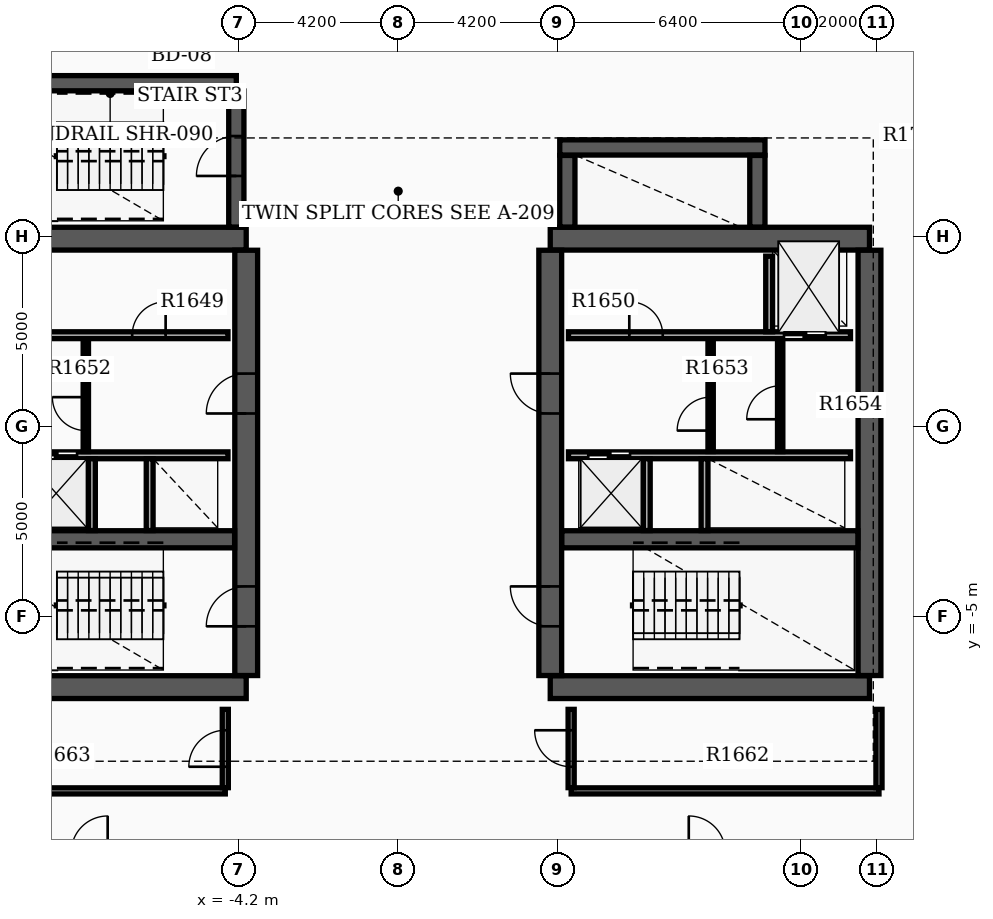
"""IFC4 building model, lengths in metres.
Left out: names, types, materials, properties, quantities, classifications, styles, units other than length and angle.
Written with IfcOpenShell. Run it as: python <this file> out.ifc"""

import sys

from ifc_helpers import new_model, si_unit, direction, frame, frame_2d, origin, place, context, subcontext, project, spatial, rectangle, extrude, element, fill, save


model = new_model("IFC4")
c1 = context("Model", 3, precision=1e-05, world=origin(), true_north=direction((0.0, 1.0)))
c2 = subcontext(c1, "Body", "Model", "MODEL_VIEW")
j1 = project(units=[si_unit("LENGTHUNIT", "METRE"), si_unit("PLANEANGLEUNIT", "RADIAN")], contexts=[c1])
p1 = place(None, origin())
s1 = spatial("IfcSite", under=j1, at=p1, CompositionType="ELEMENT")
p2 = place(p1, origin())
s2 = spatial("IfcBuilding", under=s1, at=p2, CompositionType="ELEMENT")
p3 = place(p2, frame((0.0, 0.0, 108.6)))
s3 = spatial("IfcBuildingStorey", under=s2, at=p3, CompositionType="ELEMENT", Elevation=108.6)
for number, where, z_axis, x_axis in (
    (1, (-12.4, -6.85, 0.0), (0.0, 0.0, 1.0), (1.0, 0.0, 0.0)),
    (2, (-12.4, 4.95, 0.0), (0.0, 0.0, 1.0), (1.0, 0.0, 0.0)),
):
    element("IfcWall", number, at=place(p3, frame(where, z_axis=z_axis, x_axis=x_axis)), inside=s3, PredefinedType="SHEAR", context=c2, shape_type="SweptSolid", body=[
        extrude(rectangle(XDim=8.4, YDim=0.6, at=frame_2d((4.2, 0.0))), origin(), (0.0, 0.0, 1.0), 3.7),
    ])
p4 = place(p3, frame((-4.0, -6.545, 0.0), z_axis=(0.0, 0.0, 1.0), x_axis=(0.0, 1.0, 0.0)))
e3 = element("IfcWall", 3, at=p4, inside=s3, PredefinedType="SHEAR", context=c2, shape_type="SweptSolid", body=[
    extrude(rectangle(XDim=11.19, YDim=0.6, at=frame_2d((5.595, 0.0))), origin(), (0.0, 0.0, 1.0), 3.7),
])
p5 = place(p4, frame((1.295, 0.0, 0.0)))
e4 = element("IfcOpeningElement", 4, at=p5, cuts=e3, PredefinedType="OPENING", context=c2, shape_type="SweptSolid", body=[
    extrude(rectangle(XDim=1.05, YDim=2.15, at=frame_2d((0.525, 1.075))), frame((0.0, 0.31, 0.0), z_axis=(0.0, -1.0, 0.0), x_axis=(1.0, 0.0, 0.0)), (0.0, 0.0, 1.0), 0.62),
])
p6 = place(p4, frame((6.895, 0.0, 0.0)))
e5 = element("IfcOpeningElement", 5, at=p6, cuts=e3, PredefinedType="OPENING", context=c2, shape_type="SweptSolid", body=[
    extrude(rectangle(XDim=1.05, YDim=2.15, at=frame_2d((0.525, 1.075))), frame((0.0, 0.31, 0.0), z_axis=(0.0, -1.0, 0.0), x_axis=(1.0, 0.0, 0.0)), (0.0, 0.0, 1.0), 0.62),
])
p7 = place(p3, frame((-12.095, -2.96, 0.0), z_axis=(0.0, 0.0, 1.0), x_axis=(1.0, 0.0, 0.0)))
e6 = element("IfcWall", 6, at=p7, inside=s3, PredefinedType="SHEAR", context=c2, shape_type="SweptSolid", body=[
    extrude(rectangle(XDim=7.79, YDim=0.45, at=frame_2d((3.895, 0.0))), origin(), (0.0, 0.0, 1.0), 3.7),
])
for number, where, z_axis, x_axis in (
    (7, (4.0, -6.85, 0.0), (0.0, 0.0, 1.0), (1.0, 0.0, 0.0)),
    (8, (4.0, 4.95, 0.0), (0.0, 0.0, 1.0), (1.0, 0.0, 0.0)),
):
    element("IfcWall", number, at=place(p3, frame(where, z_axis=z_axis, x_axis=x_axis)), inside=s3, PredefinedType="SHEAR", context=c2, shape_type="SweptSolid", body=[
        extrude(rectangle(XDim=8.4, YDim=0.6, at=frame_2d((4.2, 0.0))), origin(), (0.0, 0.0, 1.0), 3.7),
    ])
p8 = place(p3, frame((4.0, -6.545, 0.0), z_axis=(0.0, 0.0, 1.0), x_axis=(0.0, 1.0, 0.0)))
e9 = element("IfcWall", 9, at=p8, inside=s3, PredefinedType="SHEAR", context=c2, shape_type="SweptSolid", body=[
    extrude(rectangle(XDim=11.19, YDim=0.6, at=frame_2d((5.595, 0.0))), origin(), (0.0, 0.0, 1.0), 3.7),
])
p9 = place(p8, frame((1.295, 0.0, 0.0)))
e10 = element("IfcOpeningElement", 10, at=p9, cuts=e9, PredefinedType="OPENING", context=c2, shape_type="SweptSolid", body=[
    extrude(rectangle(XDim=1.05, YDim=2.15, at=frame_2d((0.525, 1.075))), frame((0.0, 0.31, 0.0), z_axis=(0.0, -1.0, 0.0), x_axis=(1.0, 0.0, 0.0)), (0.0, 0.0, 1.0), 0.62),
])
p10 = place(p8, frame((6.895, 0.0, 0.0)))
e11 = element("IfcOpeningElement", 11, at=p10, cuts=e9, PredefinedType="OPENING", context=c2, shape_type="SweptSolid", body=[
    extrude(rectangle(XDim=1.05, YDim=2.15, at=frame_2d((0.525, 1.075))), frame((0.0, 0.31, 0.0), z_axis=(0.0, -1.0, 0.0), x_axis=(1.0, 0.0, 0.0)), (0.0, 0.0, 1.0), 0.62),
])
p11 = place(p3, frame((12.4, -6.545, 0.0), z_axis=(0.0, 0.0, 1.0), x_axis=(0.0, 1.0, 0.0)))
e12 = element("IfcWall", 12, at=p11, inside=s3, PredefinedType="SHEAR", context=c2, shape_type="SweptSolid", body=[
    extrude(rectangle(XDim=11.19, YDim=0.6, at=frame_2d((5.595, 0.0))), origin(), (0.0, 0.0, 1.0), 3.7),
])
p12 = place(p3, frame((4.305, -2.96, 0.0), z_axis=(0.0, 0.0, 1.0), x_axis=(1.0, 0.0, 0.0)))
e13 = element("IfcWall", 13, at=p12, inside=s3, PredefinedType="SHEAR", context=c2, shape_type="SweptSolid", body=[
    extrude(rectangle(XDim=7.79, YDim=0.45, at=frame_2d((3.895, 0.0))), origin(), (0.0, 0.0, 1.0), 3.7),
])
p13 = place(p3, frame((-12.22, 9.04, 0.0), z_axis=(0.0, 0.0, 1.0), x_axis=(1.0, 0.0, 0.0)))
e14 = element("IfcWall", 14, at=p13, inside=s3, PredefinedType="SHEAR", context=c2, shape_type="SweptSolid", body=[
    extrude(rectangle(XDim=7.96, YDim=0.4, at=frame_2d((3.98, 0.0))), origin(), (0.0, 0.0, 1.0), 3.7),
])
p14 = place(p3, frame((-4.26, 5.255, 0.0), z_axis=(0.0, 0.0, 1.0), x_axis=(0.0, 1.0, 0.0)))
e15 = element("IfcWall", 15, at=p14, inside=s3, PredefinedType="SHEAR", context=c2, shape_type="SweptSolid", body=[
    extrude(rectangle(XDim=3.58, YDim=0.4, at=frame_2d((1.79, 0.0))), origin(), (0.0, 0.0, 1.0), 3.7),
])
p15 = place(p14, frame((1.345, 0.0, 0.0)))
e16 = element("IfcOpeningElement", 16, at=p15, cuts=e15, PredefinedType="OPENING", context=c2, shape_type="SweptSolid", body=[
    extrude(rectangle(XDim=1.05, YDim=2.15, at=frame_2d((0.525, 1.075))), frame((0.0, 0.21, 0.0), z_axis=(0.0, -1.0, 0.0), x_axis=(1.0, 0.0, 0.0)), (0.0, 0.0, 1.0), 0.42),
])
p16 = place(p3, frame((4.45, 5.255, 0.0), z_axis=(0.0, 0.0, 1.0), x_axis=(0.0, 1.0, 0.0)))
e17 = element("IfcWall", 17, at=p16, inside=s3, PredefinedType="SHEAR", context=c2, shape_type="SweptSolid", body=[
    extrude(rectangle(XDim=1.885, YDim=0.4, at=frame_2d((0.942, 0.0))), origin(), (0.0, 0.0, 1.0), 3.7),
])
p17 = place(p3, frame((4.25, 7.35, 0.0), z_axis=(0.0, 0.0, 1.0), x_axis=(1.0, 0.0, 0.0)))
e18 = element("IfcWall", 18, at=p17, inside=s3, PredefinedType="SHEAR", context=c2, shape_type="SweptSolid", body=[
    extrude(rectangle(XDim=5.4, YDim=0.4, at=frame_2d((2.7, 0.0))), origin(), (0.0, 0.0, 1.0), 3.7),
])
p18 = place(p3, frame((9.45, 5.255, 0.0), z_axis=(0.0, 0.0, 1.0), x_axis=(0.0, 1.0, 0.0)))
e19 = element("IfcWall", 19, at=p18, inside=s3, PredefinedType="SHEAR", context=c2, shape_type="SweptSolid", body=[
    extrude(rectangle(XDim=1.885, YDim=0.4, at=frame_2d((0.942, 0.0))), origin(), (0.0, 0.0, 1.0), 3.7),
])
p19 = place(p3, frame((-11.9, 2.41, 0.0), z_axis=(0.0, 0.0, 1.0), x_axis=(1.0, 0.0, 0.0)))
e20 = element("IfcWall", 20, at=p19, inside=s3, PredefinedType="SOLIDWALL", context=c2, shape_type="SweptSolid", body=[
    extrude(rectangle(XDim=7.42, YDim=0.18, at=frame_2d((3.71, 0.0))), origin(), (0.0, 0.0, 1.0), 2.96),
])
p20 = place(p19, frame((0.55, 0.0, 0.0)))
e21 = element("IfcOpeningElement", 21, at=p20, cuts=e20, PredefinedType="OPENING", context=c2, shape_type="SweptSolid", body=[
    extrude(rectangle(XDim=1.1, YDim=2.15, at=frame_2d((0.55, 1.075))), frame((0.0, 0.1, 0.0), z_axis=(0.0, -1.0, 0.0), x_axis=(1.0, 0.0, 0.0)), (0.0, 0.0, 1.0), 0.2),
])
p21 = place(p19, frame((4.9, 0.0, 0.0)))
e22 = element("IfcOpeningElement", 22, at=p21, cuts=e20, PredefinedType="OPENING", context=c2, shape_type="SweptSolid", body=[
    extrude(rectangle(XDim=0.88, YDim=2.1, at=frame_2d((0.44, 1.05))), frame((0.0, 0.1, 0.0), z_axis=(0.0, -1.0, 0.0), x_axis=(1.0, 0.0, 0.0)), (0.0, 0.0, 1.0), 0.2),
])
p22 = place(p3, frame((4.48, 2.41, 0.0), z_axis=(0.0, 0.0, 1.0), x_axis=(1.0, 0.0, 0.0)))
e23 = element("IfcWall", 23, at=p22, inside=s3, PredefinedType="SOLIDWALL", context=c2, shape_type="SweptSolid", body=[
    extrude(rectangle(XDim=7.42, YDim=0.18, at=frame_2d((3.71, 0.0))), origin(), (0.0, 0.0, 1.0), 2.96),
])
p23 = place(p22, frame((5.67, 0.0, 0.0)))
e24 = element("IfcOpeningElement", 24, at=p23, cuts=e23, PredefinedType="OPENING", context=c2, shape_type="SweptSolid", body=[
    extrude(rectangle(XDim=1.1, YDim=2.15, at=frame_2d((0.55, 1.075))), frame((0.0, 0.1, 0.0), z_axis=(0.0, -1.0, 0.0), x_axis=(1.0, 0.0, 0.0)), (0.0, 0.0, 1.0), 0.2),
])
p24 = place(p22, frame((1.6, 0.0, 0.0)))
e25 = element("IfcOpeningElement", 25, at=p24, cuts=e23, PredefinedType="OPENING", context=c2, shape_type="SweptSolid", body=[
    extrude(rectangle(XDim=0.88, YDim=2.1, at=frame_2d((0.44, 1.05))), frame((0.0, 0.1, 0.0), z_axis=(0.0, -1.0, 0.0), x_axis=(1.0, 0.0, 0.0)), (0.0, 0.0, 1.0), 0.2),
])
p25 = place(p3, frame((-11.9, -0.75, 0.0), z_axis=(0.0, 0.0, 1.0), x_axis=(1.0, 0.0, 0.0)))
e26 = element("IfcWall", 26, at=p25, inside=s3, PredefinedType="SOLIDWALL", context=c2, shape_type="SweptSolid", body=[
    extrude(rectangle(XDim=7.42, YDim=0.18, at=frame_2d((3.71, 0.0))), origin(), (0.0, 0.0, 1.0), 2.96),
])
p26 = place(p25, frame((0.45, 0.0, 0.0)))
e27 = element("IfcOpeningElement", 27, at=p26, cuts=e26, PredefinedType="OPENING", context=c2, shape_type="SweptSolid", body=[
    extrude(rectangle(XDim=1.1, YDim=2.15, at=frame_2d((0.55, 1.075))), frame((0.0, 0.1, 0.0), z_axis=(0.0, -1.0, 0.0), x_axis=(1.0, 0.0, 0.0)), (0.0, 0.0, 1.0), 0.2),
])
p27 = place(p25, frame((2.35, 0.0, 0.0)))
e28 = element("IfcOpeningElement", 28, at=p27, cuts=e26, PredefinedType="OPENING", context=c2, shape_type="SweptSolid", body=[
    extrude(rectangle(XDim=1.1, YDim=2.15, at=frame_2d((0.55, 1.075))), frame((0.0, 0.1, 0.0), z_axis=(0.0, -1.0, 0.0), x_axis=(1.0, 0.0, 0.0)), (0.0, 0.0, 1.0), 0.2),
])
p28 = place(p3, frame((4.48, -0.75, 0.0), z_axis=(0.0, 0.0, 1.0), x_axis=(1.0, 0.0, 0.0)))
e29 = element("IfcWall", 29, at=p28, inside=s3, PredefinedType="SOLIDWALL", context=c2, shape_type="SweptSolid", body=[
    extrude(rectangle(XDim=7.42, YDim=0.18, at=frame_2d((3.71, 0.0))), origin(), (0.0, 0.0, 1.0), 2.96),
])
p29 = place(p28, frame((0.52, 0.0, 0.0)))
e30 = element("IfcOpeningElement", 30, at=p29, cuts=e29, PredefinedType="OPENING", context=c2, shape_type="SweptSolid", body=[
    extrude(rectangle(XDim=1.1, YDim=2.15, at=frame_2d((0.55, 1.075))), frame((0.0, 0.1, 0.0), z_axis=(0.0, -1.0, 0.0), x_axis=(1.0, 0.0, 0.0)), (0.0, 0.0, 1.0), 0.2),
])
p30 = place(p3, frame((9.76, 2.5, 0.0), z_axis=(0.0, 0.0, 1.0), x_axis=(0.0, 1.0, 0.0)))
e31 = element("IfcWall", 31, at=p30, inside=s3, PredefinedType="SOLIDWALL", context=c2, shape_type="SweptSolid", body=[
    extrude(rectangle(XDim=1.99, YDim=0.18, at=frame_2d((0.995, 0.0))), origin(), (0.0, 0.0, 1.0), 2.96),
])
for number, where, z_axis, x_axis in (
    (32, (-8.06, -2.73, 0.0), (0.0, 0.0, 1.0), (0.0, 1.0, 0.0)),
    (33, (-6.54, -2.73, 0.0), (0.0, 0.0, 1.0), (0.0, 1.0, 0.0)),
    (34, (6.54, -2.73, 0.0), (0.0, 0.0, 1.0), (0.0, 1.0, 0.0)),
    (35, (8.06, -2.73, 0.0), (0.0, 0.0, 1.0), (0.0, 1.0, 0.0)),
):
    element("IfcWall", number, at=place(p3, frame(where, z_axis=z_axis, x_axis=x_axis)), inside=s3, PredefinedType="SOLIDWALL", context=c2, shape_type="SweptSolid", body=[
        extrude(rectangle(XDim=1.89, YDim=0.18, at=frame_2d((0.945, 0.0))), origin(), (0.0, 0.0, 1.0), 2.96),
    ])
p31 = place(p3, frame((-8.22, -0.65, 0.0), z_axis=(0.0, 0.0, 1.0), x_axis=(0.0, 1.0, 0.0)))
e36 = element("IfcWall", 36, at=p31, inside=s3, PredefinedType="SOLIDWALL", context=c2, shape_type="SweptSolid", body=[
    extrude(rectangle(XDim=2.96, YDim=0.14, at=frame_2d((1.48, 0.0))), origin(), (0.0, 0.0, 1.0), 2.96),
])
p32 = place(p31, frame((0.55, 0.0, 0.0)))
e37 = element("IfcOpeningElement", 37, at=p32, cuts=e36, PredefinedType="OPENING", context=c2, shape_type="SweptSolid", body=[
    extrude(rectangle(XDim=0.88, YDim=2.1, at=frame_2d((0.44, 1.05))), frame((0.0, 0.08, 0.0), z_axis=(0.0, -1.0, 0.0), x_axis=(1.0, 0.0, 0.0)), (0.0, 0.0, 1.0), 0.16),
])
p33 = place(p3, frame((8.22, -0.65, 0.0), z_axis=(0.0, 0.0, 1.0), x_axis=(0.0, 1.0, 0.0)))
e38 = element("IfcWall", 38, at=p33, inside=s3, PredefinedType="SOLIDWALL", context=c2, shape_type="SweptSolid", body=[
    extrude(rectangle(XDim=2.96, YDim=0.14, at=frame_2d((1.48, 0.0))), origin(), (0.0, 0.0, 1.0), 2.96),
])
p34 = place(p33, frame((0.55, 0.0, 0.0)))
e39 = element("IfcOpeningElement", 39, at=p34, cuts=e38, PredefinedType="OPENING", context=c2, shape_type="SweptSolid", body=[
    extrude(rectangle(XDim=0.88, YDim=2.1, at=frame_2d((0.44, 1.05))), frame((0.0, 0.08, 0.0), z_axis=(0.0, -1.0, 0.0), x_axis=(1.0, 0.0, 0.0)), (0.0, 0.0, 1.0), 0.16),
])
p35 = place(p3, frame((10.05, -0.652, 0.0), z_axis=(0.0, 0.0, 1.0), x_axis=(0.0, 1.0, 0.0)))
e40 = element("IfcWall", 40, at=p35, inside=s3, PredefinedType="PARTITIONING", context=c2, shape_type="SweptSolid", body=[
    extrude(rectangle(XDim=2.962, YDim=0.14, at=frame_2d((1.481, 0.0))), origin(), (0.0, 0.0, 1.0), 2.96),
])
p36 = place(p35, frame((0.85, 0.0, 0.0)))
e41 = element("IfcOpeningElement", 41, at=p36, cuts=e40, PredefinedType="OPENING", context=c2, shape_type="SweptSolid", body=[
    extrude(rectangle(XDim=0.88, YDim=2.1, at=frame_2d((0.44, 1.05))), frame((0.0, 0.08, 0.0), z_axis=(0.0, -1.0, 0.0), x_axis=(1.0, 0.0, 0.0)), (0.0, 0.0, 1.0), 0.16),
])
p37 = place(p3, frame((4.55, -9.58, 0.0), z_axis=(0.0, 0.0, 1.0), x_axis=(1.0, 0.0, 0.0)))
e42 = element("IfcWall", 42, at=p37, inside=s3, PredefinedType="PARTITIONING", context=c2, shape_type="SweptSolid", body=[
    extrude(rectangle(XDim=8.1, YDim=0.16, at=frame_2d((4.05, 0.0))), origin(), (0.0, 0.0, 1.0), 2.96),
])
p38 = place(p3, frame((4.55, -9.495, 0.0), z_axis=(0.0, 0.0, 1.0), x_axis=(0.0, 1.0, 0.0)))
e43 = element("IfcWall", 43, at=p38, inside=s3, PredefinedType="PARTITIONING", context=c2, shape_type="SweptSolid", body=[
    extrude(rectangle(XDim=2.06, YDim=0.16, at=frame_2d((1.03, 0.0))), origin(), (0.0, 0.0, 1.0), 2.96),
])
p39 = place(p38, frame((0.55, 0.0, 0.0)))
e44 = element("IfcOpeningElement", 44, at=p39, cuts=e43, PredefinedType="OPENING", context=c2, shape_type="SweptSolid", body=[
    extrude(rectangle(XDim=0.96, YDim=2.15, at=frame_2d((0.48, 1.075))), frame((0.0, 0.09, 0.0), z_axis=(0.0, -1.0, 0.0), x_axis=(1.0, 0.0, 0.0)), (0.0, 0.0, 1.0), 0.18),
])
p40 = place(p3, frame((12.65, -9.495, 0.0), z_axis=(0.0, 0.0, 1.0), x_axis=(0.0, 1.0, 0.0)))
e45 = element("IfcWall", 45, at=p40, inside=s3, PredefinedType="PARTITIONING", context=c2, shape_type="SweptSolid", body=[
    extrude(rectangle(XDim=2.06, YDim=0.16, at=frame_2d((1.03, 0.0))), origin(), (0.0, 0.0, 1.0), 2.96),
])
p41 = place(p3, frame((-12.65, -9.58, 0.0), z_axis=(0.0, 0.0, 1.0), x_axis=(1.0, 0.0, 0.0)))
e46 = element("IfcWall", 46, at=p41, inside=s3, PredefinedType="PARTITIONING", context=c2, shape_type="SweptSolid", body=[
    extrude(rectangle(XDim=8.1, YDim=0.16, at=frame_2d((4.05, 0.0))), origin(), (0.0, 0.0, 1.0), 2.96),
])
p42 = place(p3, frame((-4.55, -9.495, 0.0), z_axis=(0.0, 0.0, 1.0), x_axis=(0.0, 1.0, 0.0)))
e47 = element("IfcWall", 47, at=p42, inside=s3, PredefinedType="PARTITIONING", context=c2, shape_type="SweptSolid", body=[
    extrude(rectangle(XDim=2.06, YDim=0.16, at=frame_2d((1.03, 0.0))), origin(), (0.0, 0.0, 1.0), 2.96),
])
p43 = place(p42, frame((0.55, 0.0, 0.0)))
e48 = element("IfcOpeningElement", 48, at=p43, cuts=e47, PredefinedType="OPENING", context=c2, shape_type="SweptSolid", body=[
    extrude(rectangle(XDim=0.96, YDim=2.15, at=frame_2d((0.48, 1.075))), frame((0.0, 0.09, 0.0), z_axis=(0.0, -1.0, 0.0), x_axis=(1.0, 0.0, 0.0)), (0.0, 0.0, 1.0), 0.18),
])
p44 = place(p5, origin())
e49 = element("IfcDoor", 49, at=p44, inside=s3, OperationType="SINGLE_SWING_LEFT", PredefinedType="DOOR", context=c2, shape_type="SweptSolid", body=[
    extrude(rectangle(XDim=1.05, YDim=2.15, at=frame_2d((0.525, 1.075))), frame((0.0, 0.025, 0.0), z_axis=(0.0, -1.0, 0.0), x_axis=(1.0, 0.0, 0.0)), (0.0, 0.0, 1.0), 0.05),
])
fill(e4, e49)
p45 = place(p9, origin())
e50 = element("IfcDoor", 50, at=p45, inside=s3, OperationType="SINGLE_SWING_RIGHT", PredefinedType="DOOR", context=c2, shape_type="SweptSolid", body=[
    extrude(rectangle(XDim=1.05, YDim=2.15, at=frame_2d((0.525, 1.075))), frame((0.0, 0.025, 0.0), z_axis=(0.0, -1.0, 0.0), x_axis=(1.0, 0.0, 0.0)), (0.0, 0.0, 1.0), 0.05),
])
fill(e10, e50)
p46 = place(p6, origin())
e51 = element("IfcDoor", 51, at=p46, inside=s3, OperationType="SINGLE_SWING_LEFT", PredefinedType="DOOR", context=c2, shape_type="SweptSolid", body=[
    extrude(rectangle(XDim=1.05, YDim=2.15, at=frame_2d((0.525, 1.075))), frame((0.0, 0.025, 0.0), z_axis=(0.0, -1.0, 0.0), x_axis=(1.0, 0.0, 0.0)), (0.0, 0.0, 1.0), 0.05),
])
fill(e5, e51)
p47 = place(p10, origin())
e52 = element("IfcDoor", 52, at=p47, inside=s3, OperationType="SINGLE_SWING_RIGHT", PredefinedType="DOOR", context=c2, shape_type="SweptSolid", body=[
    extrude(rectangle(XDim=1.05, YDim=2.15, at=frame_2d((0.525, 1.075))), frame((0.0, 0.025, 0.0), z_axis=(0.0, -1.0, 0.0), x_axis=(1.0, 0.0, 0.0)), (0.0, 0.0, 1.0), 0.05),
])
fill(e11, e52)
p48 = place(p15, origin())
e53 = element("IfcDoor", 53, at=p48, inside=s3, OperationType="SINGLE_SWING_LEFT", PredefinedType="DOOR", context=c2, shape_type="SweptSolid", body=[
    extrude(rectangle(XDim=1.05, YDim=2.15, at=frame_2d((0.525, 1.075))), frame((0.0, 0.025, 0.0), z_axis=(0.0, -1.0, 0.0), x_axis=(1.0, 0.0, 0.0)), (0.0, 0.0, 1.0), 0.05),
])
fill(e16, e53)
p49 = place(p23, origin())
e54 = element("IfcDoor", 54, at=p49, inside=s3, OperationType="DOUBLE_DOOR_SLIDING", PredefinedType="DOOR", context=c2, shape_type="SweptSolid", body=[
    extrude(rectangle(XDim=1.1, YDim=2.15, at=frame_2d((0.55, 1.075))), frame((0.0, 0.025, 0.0), z_axis=(0.0, -1.0, 0.0), x_axis=(1.0, 0.0, 0.0)), (0.0, 0.0, 1.0), 0.05),
])
fill(e24, e54)
p50 = place(p27, origin())
e55 = element("IfcDoor", 55, at=p50, inside=s3, OperationType="DOUBLE_DOOR_SLIDING", PredefinedType="DOOR", context=c2, shape_type="SweptSolid", body=[
    extrude(rectangle(XDim=1.1, YDim=2.15, at=frame_2d((0.55, 1.075))), frame((0.0, 0.025, 0.0), z_axis=(0.0, -1.0, 0.0), x_axis=(1.0, 0.0, 0.0)), (0.0, 0.0, 1.0), 0.05),
])
fill(e28, e55)
p51 = place(p29, origin())
e56 = element("IfcDoor", 56, at=p51, inside=s3, OperationType="DOUBLE_DOOR_SLIDING", PredefinedType="DOOR", context=c2, shape_type="SweptSolid", body=[
    extrude(rectangle(XDim=1.1, YDim=2.15, at=frame_2d((0.55, 1.075))), frame((0.0, 0.025, 0.0), z_axis=(0.0, -1.0, 0.0), x_axis=(1.0, 0.0, 0.0)), (0.0, 0.0, 1.0), 0.05),
])
fill(e30, e56)
p52 = place(p21, origin())
e57 = element("IfcDoor", 57, at=p52, inside=s3, OperationType="SINGLE_SWING_RIGHT", PredefinedType="DOOR", context=c2, shape_type="SweptSolid", body=[
    extrude(rectangle(XDim=0.88, YDim=2.1, at=frame_2d((0.44, 1.05))), frame((0.0, 0.025, 0.0), z_axis=(0.0, -1.0, 0.0), x_axis=(1.0, 0.0, 0.0)), (0.0, 0.0, 1.0), 0.05),
])
fill(e22, e57)
p53 = place(p24, origin())
e58 = element("IfcDoor", 58, at=p53, inside=s3, OperationType="SINGLE_SWING_LEFT", PredefinedType="DOOR", context=c2, shape_type="SweptSolid", body=[
    extrude(rectangle(XDim=0.88, YDim=2.1, at=frame_2d((0.44, 1.05))), frame((0.0, 0.025, 0.0), z_axis=(0.0, -1.0, 0.0), x_axis=(1.0, 0.0, 0.0)), (0.0, 0.0, 1.0), 0.05),
])
fill(e25, e58)
p54 = place(p32, origin())
e59 = element("IfcDoor", 59, at=p54, inside=s3, OperationType="SINGLE_SWING_RIGHT", PredefinedType="DOOR", context=c2, shape_type="SweptSolid", body=[
    extrude(rectangle(XDim=0.88, YDim=2.1, at=frame_2d((0.44, 1.05))), frame((0.0, 0.025, 0.0), z_axis=(0.0, -1.0, 0.0), x_axis=(1.0, 0.0, 0.0)), (0.0, 0.0, 1.0), 0.05),
])
fill(e37, e59)
p55 = place(p34, origin())
e60 = element("IfcDoor", 60, at=p55, inside=s3, OperationType="SINGLE_SWING_LEFT", PredefinedType="DOOR", context=c2, shape_type="SweptSolid", body=[
    extrude(rectangle(XDim=0.88, YDim=2.1, at=frame_2d((0.44, 1.05))), frame((0.0, 0.025, 0.0), z_axis=(0.0, -1.0, 0.0), x_axis=(1.0, 0.0, 0.0)), (0.0, 0.0, 1.0), 0.05),
])
fill(e39, e60)
p56 = place(p36, origin())
e61 = element("IfcDoor", 61, at=p56, inside=s3, OperationType="SINGLE_SWING_LEFT", PredefinedType="DOOR", context=c2, shape_type="SweptSolid", body=[
    extrude(rectangle(XDim=0.88, YDim=2.1, at=frame_2d((0.44, 1.05))), frame((0.0, 0.025, 0.0), z_axis=(0.0, -1.0, 0.0), x_axis=(1.0, 0.0, 0.0)), (0.0, 0.0, 1.0), 0.05),
])
fill(e41, e61)
p57 = place(p39, origin())
e62 = element("IfcDoor", 62, at=p57, inside=s3, OperationType="SINGLE_SWING_RIGHT", PredefinedType="DOOR", context=c2, shape_type="SweptSolid", body=[
    extrude(rectangle(XDim=0.96, YDim=2.15, at=frame_2d((0.48, 1.075))), frame((0.0, 0.025, 0.0), z_axis=(0.0, -1.0, 0.0), x_axis=(1.0, 0.0, 0.0)), (0.0, 0.0, 1.0), 0.05),
])
fill(e44, e62)
p58 = place(p43, origin())
e63 = element("IfcDoor", 63, at=p58, inside=s3, OperationType="SINGLE_SWING_LEFT", PredefinedType="DOOR", context=c2, shape_type="SweptSolid", body=[
    extrude(rectangle(XDim=0.96, YDim=2.15, at=frame_2d((0.48, 1.075))), frame((0.0, 0.025, 0.0), z_axis=(0.0, -1.0, 0.0), x_axis=(1.0, 0.0, 0.0)), (0.0, 0.0, 1.0), 0.05),
])
fill(e48, e63)
save(model, sys.argv[1])
